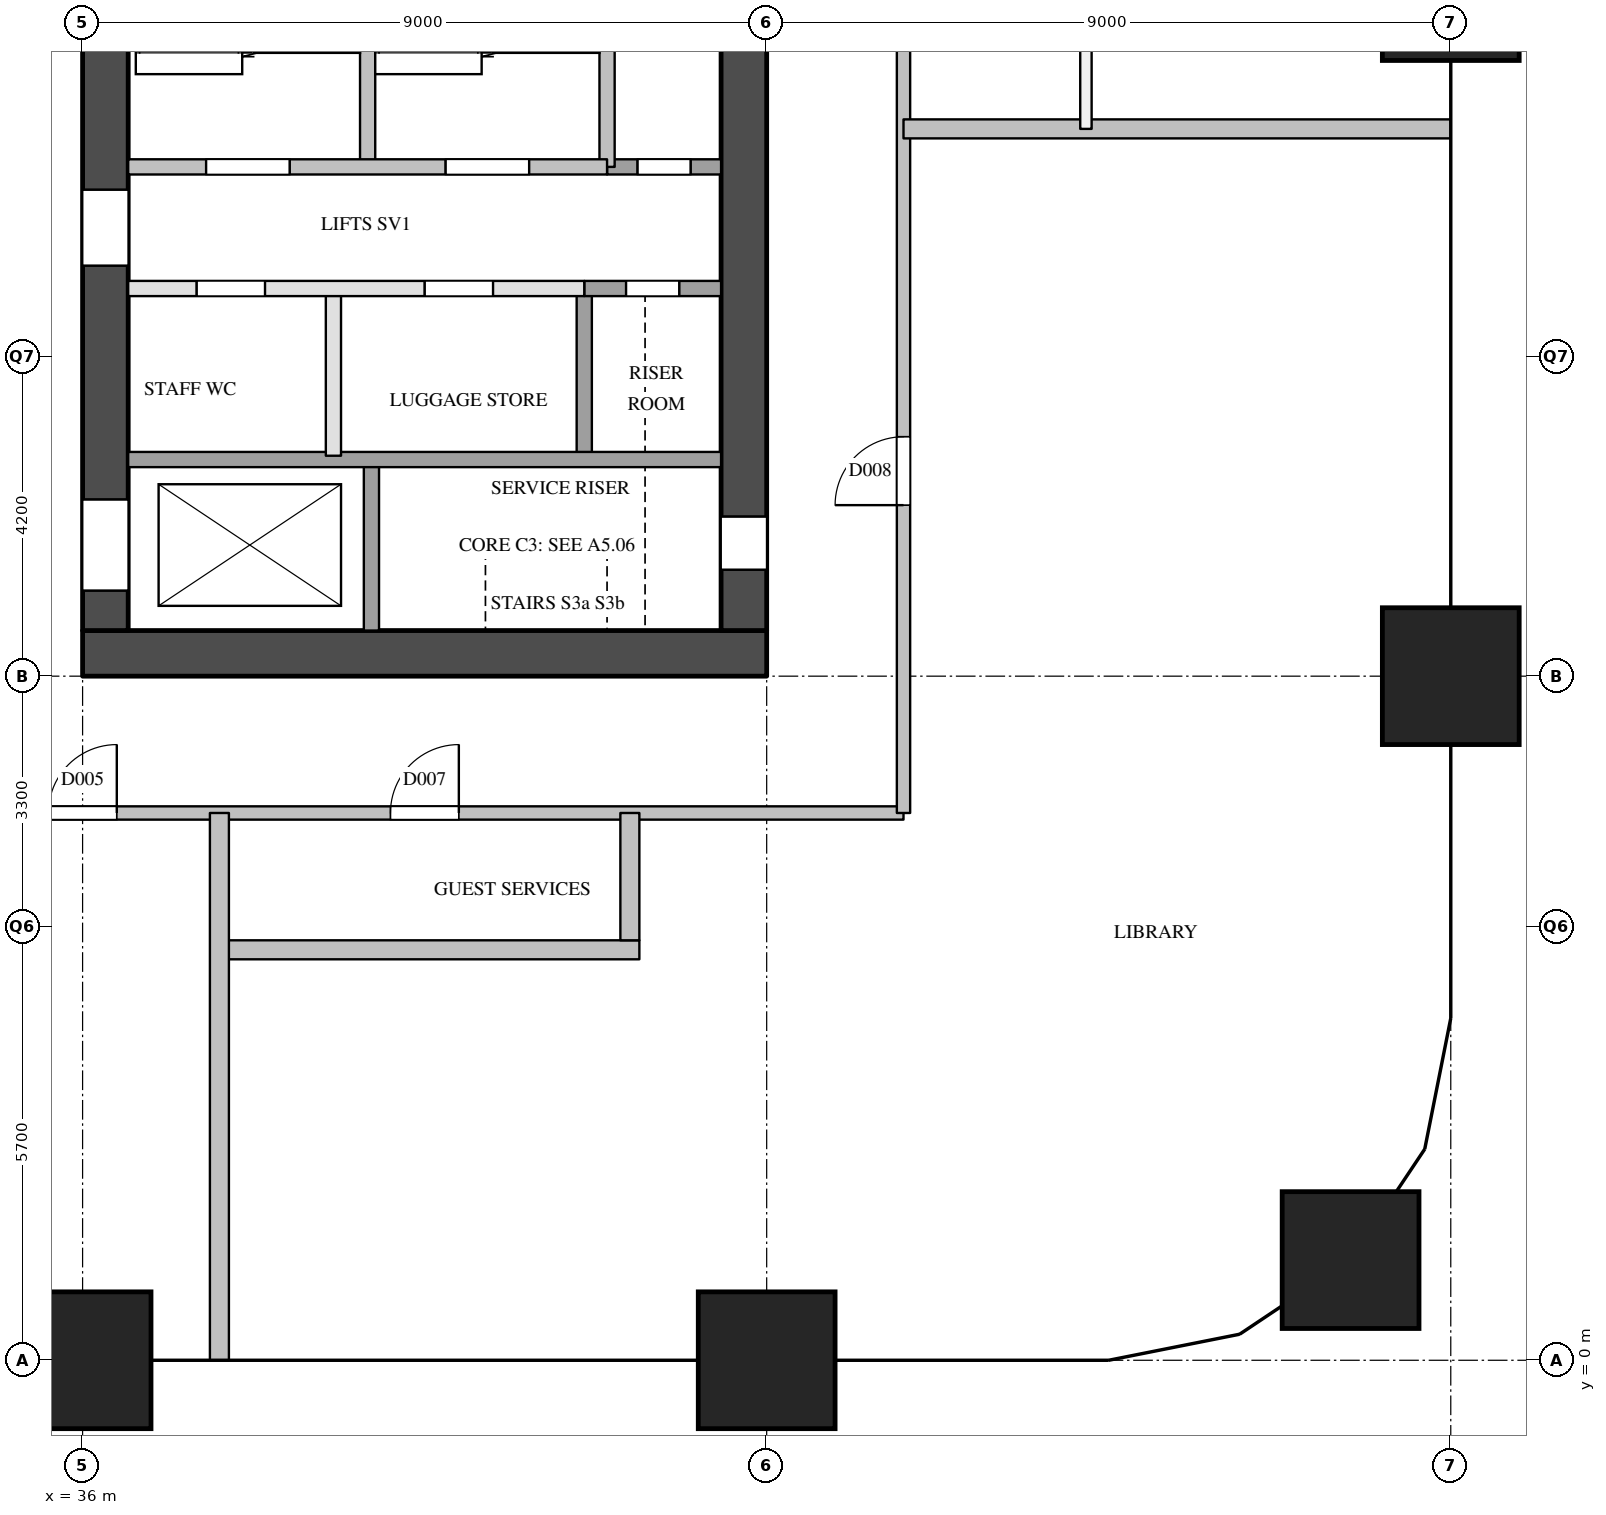
"""IFC4 building model, lengths in metres.
Left out: names, types, materials, properties, quantities, classifications, styles, units other than length and angle.
Written with IfcOpenShell. Run it as: python <this file> out.ifc"""

import sys

from ifc_helpers import new_model, si_unit, direction, frame, frame_2d, origin, origin_2d, place, context, subcontext, project, spatial, rectangle, extrude, element, fill, save


model = new_model("IFC4")
c1 = context("Model", 3, precision=1e-05, world=origin(), true_north=direction((0.0, 1.0)))
c2 = subcontext(c1, "Body", "Model", "MODEL_VIEW")
j1 = project(units=[si_unit("LENGTHUNIT", "METRE"), si_unit("PLANEANGLEUNIT", "RADIAN")], contexts=[c1])
p1 = place(None, origin())
s1 = spatial("IfcSite", under=j1, at=p1, CompositionType="ELEMENT")
p2 = place(p1, origin())
s2 = spatial("IfcBuilding", under=s1, at=p2, CompositionType="ELEMENT")
p3 = place(p2, frame((0.0, 0.0, 31.0)))
s3 = spatial("IfcBuildingStorey", under=s2, at=p3, CompositionType="ELEMENT", Elevation=31.0)
for number, where, z_axis, x_axis in (
    (1, (36.0, 0.0, 0.0), (0.0, 0.0, 1.0), (1.0, 0.0, 0.0)),
    (2, (45.0, 0.0, 0.0), (0.0, 0.0, 1.0), (1.0, 0.0, 0.0)),
    (3, (52.682, 1.318, 0.0), (0.0, 0.0, 1.0), (1.0, 0.0, 0.0)),
    (4, (54.0, 9.0, 0.0), (0.0, 0.0, 1.0), (1.0, 0.0, 0.0)),
    (5, (54.0, 18.0, 0.0), (0.0, 0.0, 1.0), (1.0, 0.0, 0.0)),
):
    element("IfcColumn", number, at=place(p3, frame(where, z_axis=z_axis, x_axis=x_axis)), inside=s3, PredefinedType="COLUMN", context=c2, shape_type="SweptSolid", body=[
        extrude(rectangle(XDim=1.8, YDim=1.8, at=origin_2d()), origin(), (0.0, 0.0, 1.0), 3.8),
    ])
p4 = place(p3, frame((36.0, 9.3, 0.0), z_axis=(0.0, 0.0, 1.0), x_axis=(1.0, 0.0, 0.0)))
e6 = element("IfcWall", 6, at=p4, inside=s3, PredefinedType="SHEAR", context=c2, shape_type="SweptSolid", body=[
    extrude(rectangle(XDim=9.0, YDim=0.6, at=frame_2d((4.5, 0.0))), origin(), (0.0, 0.0, 1.0), 3.5),
])
p5 = place(p3, frame((36.3, 9.6, 0.0), z_axis=(0.0, 0.0, 1.0), x_axis=(0.0, 1.0, 0.0)))
e7 = element("IfcWall", 7, at=p5, inside=s3, PredefinedType="SHEAR", context=c2, shape_type="SweptSolid", body=[
    extrude(rectangle(XDim=12.3, YDim=0.6, at=frame_2d((6.15, 0.0))), origin(), (0.0, 0.0, 1.0), 3.5),
])
p6 = place(p5, frame((0.525, 0.0, 0.0)))
e8 = element("IfcOpeningElement", 8, at=p6, cuts=e7, PredefinedType="OPENING", context=c2, shape_type="SweptSolid", body=[
    extrude(rectangle(XDim=1.2, YDim=2.1, at=frame_2d((0.6, 1.05))), frame((0.0, 0.31, 0.0), z_axis=(0.0, -1.0, 0.0), x_axis=(1.0, 0.0, 0.0)), (0.0, 0.0, 1.0), 0.62),
])
p7 = place(p5, frame((4.8, 0.0, 0.0)))
e9 = element("IfcOpeningElement", 9, at=p7, cuts=e7, PredefinedType="OPENING", context=c2, shape_type="SweptSolid", body=[
    extrude(rectangle(XDim=1.0, YDim=2.1, at=frame_2d((0.5, 1.05))), frame((0.0, 0.31, 0.0), z_axis=(0.0, -1.0, 0.0), x_axis=(1.0, 0.0, 0.0)), (0.0, 0.0, 1.0), 0.62),
])
p8 = place(p3, frame((44.7, 9.6, 0.0), z_axis=(0.0, 0.0, 1.0), x_axis=(0.0, 1.0, 0.0)))
e10 = element("IfcWall", 10, at=p8, inside=s3, PredefinedType="SHEAR", context=c2, shape_type="SweptSolid", body=[
    extrude(rectangle(XDim=12.3, YDim=0.6, at=frame_2d((6.15, 0.0))), origin(), (0.0, 0.0, 1.0), 3.5),
])
p9 = place(p8, frame((0.8, 0.0, 0.0)))
e11 = element("IfcOpeningElement", 11, at=p9, cuts=e10, PredefinedType="OPENING", context=c2, shape_type="SweptSolid", body=[
    extrude(rectangle(XDim=0.7, YDim=2.1, at=frame_2d((0.35, 1.05))), frame((0.0, 0.31, 0.0), z_axis=(0.0, -1.0, 0.0), x_axis=(1.0, 0.0, 0.0)), (0.0, 0.0, 1.0), 0.62),
])
p10 = place(p3, frame((39.3, 11.9, 0.0), z_axis=(0.0, 0.0, 1.0), x_axis=(0.0, 1.0, 0.0)))
e12 = element("IfcWall", 12, at=p10, inside=s3, PredefinedType="PARTITIONING", context=c2, shape_type="SweptSolid", body=[
    extrude(rectangle(XDim=2.2, YDim=0.2, at=frame_2d((1.1, 0.0))), origin(), (0.0, 0.0, 1.0), 3.5),
])
p11 = place(p3, frame((39.75, 15.7, 0.0), z_axis=(0.0, 0.0, 1.0), x_axis=(0.0, 1.0, 0.0)))
e13 = element("IfcWall", 13, at=p11, inside=s3, PredefinedType="SOLIDWALL", context=c2, shape_type="SweptSolid", body=[
    extrude(rectangle(XDim=4.3, YDim=0.2, at=frame_2d((2.15, 0.0))), origin(), (0.0, 0.0, 1.0), 3.5),
])
p12 = place(p3, frame((39.8, 9.6, 0.0), z_axis=(0.0, 0.0, 1.0), x_axis=(0.0, 1.0, 0.0)))
e14 = element("IfcWall", 14, at=p12, inside=s3, PredefinedType="SOLIDWALL", context=c2, shape_type="SweptSolid", body=[
    extrude(rectangle(XDim=2.3, YDim=0.2, at=frame_2d((1.15, 0.0))), origin(), (0.0, 0.0, 1.0), 3.5),
])
p13 = place(p3, frame((42.6, 11.9, 0.0), z_axis=(0.0, 0.0, 1.0), x_axis=(0.0, 1.0, 0.0)))
e15 = element("IfcWall", 15, at=p13, inside=s3, PredefinedType="SOLIDWALL", context=c2, shape_type="SweptSolid", body=[
    extrude(rectangle(XDim=2.2, YDim=0.2, at=frame_2d((1.1, 0.0))), origin(), (0.0, 0.0, 1.0), 3.5),
])
p14 = place(p3, frame((42.9, 15.7, 0.0), z_axis=(0.0, 0.0, 1.0), x_axis=(0.0, 1.0, 0.0)))
e16 = element("IfcWall", 16, at=p14, inside=s3, PredefinedType="SOLIDWALL", context=c2, shape_type="SweptSolid", body=[
    extrude(rectangle(XDim=4.3, YDim=0.2, at=frame_2d((2.15, 0.0))), origin(), (0.0, 0.0, 1.0), 3.5),
])
p15 = place(p3, frame((36.6, 11.85, 0.0), z_axis=(0.0, 0.0, 1.0), x_axis=(1.0, 0.0, 0.0)))
e17 = element("IfcWall", 17, at=p15, inside=s3, PredefinedType="SOLIDWALL", context=c2, shape_type="SweptSolid", body=[
    extrude(rectangle(XDim=7.8, YDim=0.2, at=frame_2d((3.9, 0.0))), origin(), (0.0, 0.0, 1.0), 3.5),
])
p16 = place(p3, frame((36.6, 14.1, 0.0), z_axis=(0.0, 0.0, 1.0), x_axis=(1.0, 0.0, 0.0)))
e18 = element("IfcWall", 18, at=p16, inside=s3, PredefinedType="PARTITIONING", context=c2, shape_type="SweptSolid", body=[
    extrude(rectangle(XDim=6.0, YDim=0.2, at=frame_2d((3.0, 0.0))), origin(), (0.0, 0.0, 1.0), 3.5),
])
p17 = place(p16, frame((0.9, 0.0, 0.0)))
e19 = element("IfcOpeningElement", 19, at=p17, cuts=e18, PredefinedType="OPENING", context=c2, shape_type="SweptSolid", body=[
    extrude(rectangle(XDim=0.9, YDim=2.1, at=frame_2d((0.45, 1.05))), frame((0.0, 0.11, 0.0), z_axis=(0.0, -1.0, 0.0), x_axis=(1.0, 0.0, 0.0)), (0.0, 0.0, 1.0), 0.22),
])
p18 = place(p16, frame((3.9, 0.0, 0.0)))
e20 = element("IfcOpeningElement", 20, at=p18, cuts=e18, PredefinedType="OPENING", context=c2, shape_type="SweptSolid", body=[
    extrude(rectangle(XDim=0.9, YDim=2.1, at=frame_2d((0.45, 1.05))), frame((0.0, 0.11, 0.0), z_axis=(0.0, -1.0, 0.0), x_axis=(1.0, 0.0, 0.0)), (0.0, 0.0, 1.0), 0.22),
])
p19 = place(p3, frame((42.6, 14.1, 0.0), z_axis=(0.0, 0.0, 1.0), x_axis=(1.0, 0.0, 0.0)))
e21 = element("IfcWall", 21, at=p19, inside=s3, PredefinedType="SOLIDWALL", context=c2, shape_type="SweptSolid", body=[
    extrude(rectangle(XDim=1.8, YDim=0.2, at=frame_2d((0.9, 0.0))), origin(), (0.0, 0.0, 1.0), 3.5),
])
p20 = place(p19, frame((0.55, 0.0, 0.0)))
e22 = element("IfcOpeningElement", 22, at=p20, cuts=e21, PredefinedType="OPENING", context=c2, shape_type="SweptSolid", body=[
    extrude(rectangle(XDim=0.7, YDim=2.1, at=frame_2d((0.35, 1.05))), frame((0.0, 0.11, 0.0), z_axis=(0.0, -1.0, 0.0), x_axis=(1.0, 0.0, 0.0)), (0.0, 0.0, 1.0), 0.22),
])
p21 = place(p3, frame((42.9, 15.7, 0.0), z_axis=(0.0, 0.0, 1.0), x_axis=(1.0, 0.0, 0.0)))
e23 = element("IfcWall", 23, at=p21, inside=s3, PredefinedType="SOLIDWALL", context=c2, shape_type="SweptSolid", body=[
    extrude(rectangle(XDim=1.5, YDim=0.2, at=frame_2d((0.75, 0.0))), origin(), (0.0, 0.0, 1.0), 3.5),
])
p22 = place(p21, frame((0.4, 0.0, 0.0)))
e24 = element("IfcOpeningElement", 24, at=p22, cuts=e23, PredefinedType="OPENING", context=c2, shape_type="SweptSolid", body=[
    extrude(rectangle(XDim=0.7, YDim=2.1, at=frame_2d((0.35, 1.05))), frame((0.0, 0.11, 0.0), z_axis=(0.0, -1.0, 0.0), x_axis=(1.0, 0.0, 0.0)), (0.0, 0.0, 1.0), 0.22),
])
p23 = place(p3, frame((36.6, 15.7, 0.0), z_axis=(0.0, 0.0, 1.0), x_axis=(1.0, 0.0, 0.0)))
e25 = element("IfcWall", 25, at=p23, inside=s3, PredefinedType="SOLIDWALL", context=c2, shape_type="SweptSolid", body=[
    extrude(rectangle(XDim=6.3, YDim=0.2, at=frame_2d((3.15, 0.0))), origin(), (0.0, 0.0, 1.0), 3.5),
])
p24 = place(p23, frame((1.025, 0.0, 0.0)))
e26 = element("IfcOpeningElement", 26, at=p24, cuts=e25, PredefinedType="OPENING", context=c2, shape_type="SweptSolid", body=[
    extrude(rectangle(XDim=1.1, YDim=2.1, at=frame_2d((0.55, 1.05))), frame((0.0, 0.11, 0.0), z_axis=(0.0, -1.0, 0.0), x_axis=(1.0, 0.0, 0.0)), (0.0, 0.0, 1.0), 0.22),
])
p25 = place(p23, frame((4.175, 0.0, 0.0)))
e27 = element("IfcOpeningElement", 27, at=p25, cuts=e25, PredefinedType="OPENING", context=c2, shape_type="SweptSolid", body=[
    extrude(rectangle(XDim=1.1, YDim=2.1, at=frame_2d((0.55, 1.05))), frame((0.0, 0.11, 0.0), z_axis=(0.0, -1.0, 0.0), x_axis=(1.0, 0.0, 0.0)), (0.0, 0.0, 1.0), 0.22),
])
p26 = place(p3, frame((34.2, 7.2, 0.0), z_axis=(0.0, 0.0, 1.0), x_axis=(1.0, 0.0, 0.0)))
e28 = element("IfcWall", 28, at=p26, inside=s3, PredefinedType="PARTITIONING", context=c2, shape_type="SweptSolid", body=[
    extrude(rectangle(XDim=12.6, YDim=0.175, at=frame_2d((6.3, 0.0))), origin(), (0.0, 0.0, 1.0), 3.5),
])
p27 = place(p26, frame((1.35, 0.0, 0.0)))
e29 = element("IfcOpeningElement", 29, at=p27, cuts=e28, PredefinedType="OPENING", context=c2, shape_type="SweptSolid", body=[
    extrude(rectangle(XDim=0.9, YDim=2.1, at=frame_2d((0.45, 1.05))), frame((0.0, 0.097, 0.0), z_axis=(0.0, -1.0, 0.0), x_axis=(1.0, 0.0, 0.0)), (0.0, 0.0, 1.0), 0.195),
])
p28 = place(p26, frame((5.85, 0.0, 0.0)))
e30 = element("IfcOpeningElement", 30, at=p28, cuts=e28, PredefinedType="OPENING", context=c2, shape_type="SweptSolid", body=[
    extrude(rectangle(XDim=0.9, YDim=2.1, at=frame_2d((0.45, 1.05))), frame((0.0, 0.097, 0.0), z_axis=(0.0, -1.0, 0.0), x_axis=(1.0, 0.0, 0.0)), (0.0, 0.0, 1.0), 0.195),
])
p29 = place(p3, frame((46.8, 7.2, 0.0), z_axis=(0.0, 0.0, 1.0), x_axis=(0.0, 1.0, 0.0)))
e31 = element("IfcWall", 31, at=p29, inside=s3, PredefinedType="PARTITIONING", context=c2, shape_type="SweptSolid", body=[
    extrude(rectangle(XDim=16.49, YDim=0.175, at=frame_2d((8.245, 0.0))), origin(), (0.0, 0.0, 1.0), 3.5),
])
p30 = place(p29, frame((4.05, 0.0, 0.0)))
e32 = element("IfcOpeningElement", 32, at=p30, cuts=e31, PredefinedType="OPENING", context=c2, shape_type="SweptSolid", body=[
    extrude(rectangle(XDim=0.9, YDim=2.1, at=frame_2d((0.45, 1.05))), frame((0.0, 0.097, 0.0), z_axis=(0.0, -1.0, 0.0), x_axis=(1.0, 0.0, 0.0)), (0.0, 0.0, 1.0), 0.195),
])
p31 = place(p29, frame((12.245, 0.0, 0.0)))
e33 = element("IfcOpeningElement", 33, at=p31, cuts=e31, PredefinedType="OPENING", context=c2, shape_type="SweptSolid", body=[
    extrude(rectangle(XDim=1.0, YDim=2.1, at=frame_2d((0.5, 1.05))), frame((0.0, 0.097, 0.0), z_axis=(0.0, -1.0, 0.0), x_axis=(1.0, 0.0, 0.0)), (0.0, 0.0, 1.0), 0.195),
])
p32 = place(p3, frame((49.2, 16.2, 0.0), z_axis=(0.0, 0.0, 1.0), x_axis=(0.0, 1.0, 0.0)))
e34 = element("IfcWall", 34, at=p32, inside=s3, PredefinedType="PARTITIONING", context=c2, shape_type="SweptSolid", body=[
    extrude(rectangle(XDim=8.4, YDim=0.15, at=frame_2d((4.2, 0.0))), origin(), (0.0, 0.0, 1.0), 3.5),
])
p33 = place(p32, frame((3.75, 0.0, 0.0)))
e35 = element("IfcOpeningElement", 35, at=p33, cuts=e34, PredefinedType="OPENING", context=c2, shape_type="SweptSolid", body=[
    extrude(rectangle(XDim=0.9, YDim=2.1, at=frame_2d((0.45, 1.05))), frame((0.0, 0.085, 0.0), z_axis=(0.0, -1.0, 0.0), x_axis=(1.0, 0.0, 0.0)), (0.0, 0.0, 1.0), 0.17),
])
p34 = place(p3, frame((37.8, 5.4, 0.0), z_axis=(0.0, 0.0, 1.0), x_axis=(1.0, 0.0, 0.0)))
e36 = element("IfcWall", 36, at=p34, inside=s3, PredefinedType="PARTITIONING", context=c2, shape_type="SweptSolid", body=[
    extrude(rectangle(XDim=5.525, YDim=0.25, at=frame_2d((2.762, 0.0))), origin(), (0.0, 0.0, 1.0), 3.5),
])
for number, where, z_axis, x_axis in (
    (37, (46.8, 16.2, 0.0), (0.0, 0.0, 1.0), (1.0, 0.0, 0.0)),
    (38, (37.8, 0.0, 0.0), (0.0, 0.0, 1.0), (0.0, 1.0, 0.0)),
):
    element("IfcWall", number, at=place(p3, frame(where, z_axis=z_axis, x_axis=x_axis)), inside=s3, PredefinedType="PARTITIONING", context=c2, shape_type="SweptSolid", body=[
        extrude(rectangle(XDim=7.2, YDim=0.25, at=frame_2d((3.6, 0.0))), origin(), (0.0, 0.0, 1.0), 2.5),
    ])
p35 = place(p3, frame((43.2, 5.525, 0.0), z_axis=(0.0, 0.0, 1.0), x_axis=(0.0, 1.0, 0.0)))
e39 = element("IfcWall", 39, at=p35, inside=s3, PredefinedType="PARTITIONING", context=c2, shape_type="SweptSolid", body=[
    extrude(rectangle(XDim=1.675, YDim=0.25, at=frame_2d((0.837, 0.0))), origin(), (0.0, 0.0, 1.0), 3.5),
])
p36 = place(p6, origin())
e40 = element("IfcDoor", 40, at=p36, inside=s3, OperationType="SLIDING_TO_LEFT", PredefinedType="DOOR", context=c2, shape_type="SweptSolid", body=[
    extrude(rectangle(XDim=1.2, YDim=2.1, at=frame_2d((0.6, 1.05))), frame((0.0, 0.025, 0.0), z_axis=(0.0, -1.0, 0.0), x_axis=(1.0, 0.0, 0.0)), (0.0, 0.0, 1.0), 0.05),
])
fill(e8, e40)
p37 = place(p24, origin())
e41 = element("IfcDoor", 41, at=p37, inside=s3, OperationType="SINGLE_SWING_LEFT", PredefinedType="DOOR", context=c2, shape_type="SweptSolid", body=[
    extrude(rectangle(XDim=1.1, YDim=2.1, at=frame_2d((0.55, 1.05))), frame((0.0, 0.025, 0.0), z_axis=(0.0, -1.0, 0.0), x_axis=(1.0, 0.0, 0.0)), (0.0, 0.0, 1.0), 0.05),
])
fill(e26, e41)
p38 = place(p25, origin())
e42 = element("IfcDoor", 42, at=p38, inside=s3, OperationType="SINGLE_SWING_RIGHT", PredefinedType="DOOR", context=c2, shape_type="SweptSolid", body=[
    extrude(rectangle(XDim=1.1, YDim=2.1, at=frame_2d((0.55, 1.05))), frame((0.0, 0.025, 0.0), z_axis=(0.0, -1.0, 0.0), x_axis=(1.0, 0.0, 0.0)), (0.0, 0.0, 1.0), 0.05),
])
fill(e27, e42)
p39 = place(p22, origin())
e43 = element("IfcDoor", 43, at=p39, inside=s3, OperationType="SINGLE_SWING_LEFT", PredefinedType="DOOR", context=c2, shape_type="SweptSolid", body=[
    extrude(rectangle(XDim=0.7, YDim=2.1, at=frame_2d((0.35, 1.05))), frame((0.0, 0.025, 0.0), z_axis=(0.0, -1.0, 0.0), x_axis=(1.0, 0.0, 0.0)), (0.0, 0.0, 1.0), 0.05),
])
fill(e24, e43)
p40 = place(p20, origin())
e44 = element("IfcDoor", 44, at=p40, inside=s3, OperationType="SINGLE_SWING_RIGHT", PredefinedType="DOOR", context=c2, shape_type="SweptSolid", body=[
    extrude(rectangle(XDim=0.7, YDim=2.1, at=frame_2d((0.35, 1.05))), frame((0.0, 0.025, 0.0), z_axis=(0.0, -1.0, 0.0), x_axis=(1.0, 0.0, 0.0)), (0.0, 0.0, 1.0), 0.05),
])
fill(e22, e44)
p41 = place(p9, origin())
e45 = element("IfcDoor", 45, at=p41, inside=s3, OperationType="SINGLE_SWING_LEFT", PredefinedType="DOOR", context=c2, shape_type="SweptSolid", body=[
    extrude(rectangle(XDim=0.7, YDim=2.1, at=frame_2d((0.35, 1.05))), frame((0.0, 0.025, 0.0), z_axis=(0.0, -1.0, 0.0), x_axis=(1.0, 0.0, 0.0)), (0.0, 0.0, 1.0), 0.05),
])
fill(e11, e45)
p42 = place(p7, origin())
e46 = element("IfcDoor", 46, at=p42, inside=s3, OperationType="SINGLE_SWING_LEFT", PredefinedType="DOOR", context=c2, shape_type="SweptSolid", body=[
    extrude(rectangle(XDim=1.0, YDim=2.1, at=frame_2d((0.5, 1.05))), frame((0.0, 0.025, 0.0), z_axis=(0.0, -1.0, 0.0), x_axis=(1.0, 0.0, 0.0)), (0.0, 0.0, 1.0), 0.05),
])
fill(e9, e46)
p43 = place(p17, origin())
e47 = element("IfcDoor", 47, at=p43, inside=s3, OperationType="SINGLE_SWING_LEFT", PredefinedType="DOOR", context=c2, shape_type="SweptSolid", body=[
    extrude(rectangle(XDim=0.9, YDim=2.1, at=frame_2d((0.45, 1.05))), frame((0.0, 0.025, 0.0), z_axis=(0.0, -1.0, 0.0), x_axis=(1.0, 0.0, 0.0)), (0.0, 0.0, 1.0), 0.05),
])
fill(e19, e47)
p44 = place(p18, origin())
e48 = element("IfcDoor", 48, at=p44, inside=s3, OperationType="SINGLE_SWING_RIGHT", PredefinedType="DOOR", context=c2, shape_type="SweptSolid", body=[
    extrude(rectangle(XDim=0.9, YDim=2.1, at=frame_2d((0.45, 1.05))), frame((0.0, 0.025, 0.0), z_axis=(0.0, -1.0, 0.0), x_axis=(1.0, 0.0, 0.0)), (0.0, 0.0, 1.0), 0.05),
])
fill(e20, e48)
p45 = place(p27, origin())
e49 = element("IfcDoor", 49, at=p45, inside=s3, OperationType="SINGLE_SWING_RIGHT", PredefinedType="DOOR", context=c2, shape_type="SweptSolid", body=[
    extrude(rectangle(XDim=0.9, YDim=2.1, at=frame_2d((0.45, 1.05))), frame((0.0, 0.025, 0.0), z_axis=(0.0, -1.0, 0.0), x_axis=(1.0, 0.0, 0.0)), (0.0, 0.0, 1.0), 0.05),
])
fill(e29, e49)
p46 = place(p28, origin())
e50 = element("IfcDoor", 50, at=p46, inside=s3, OperationType="SINGLE_SWING_RIGHT", PredefinedType="DOOR", context=c2, shape_type="SweptSolid", body=[
    extrude(rectangle(XDim=0.9, YDim=2.1, at=frame_2d((0.45, 1.05))), frame((0.0, 0.025, 0.0), z_axis=(0.0, -1.0, 0.0), x_axis=(1.0, 0.0, 0.0)), (0.0, 0.0, 1.0), 0.05),
])
fill(e30, e50)
p47 = place(p30, origin())
e51 = element("IfcDoor", 51, at=p47, inside=s3, OperationType="SINGLE_SWING_LEFT", PredefinedType="DOOR", context=c2, shape_type="SweptSolid", body=[
    extrude(rectangle(XDim=0.9, YDim=2.1, at=frame_2d((0.45, 1.05))), frame((0.0, 0.025, 0.0), z_axis=(0.0, -1.0, 0.0), x_axis=(1.0, 0.0, 0.0)), (0.0, 0.0, 1.0), 0.05),
])
fill(e32, e51)
save(model, sys.argv[1])
